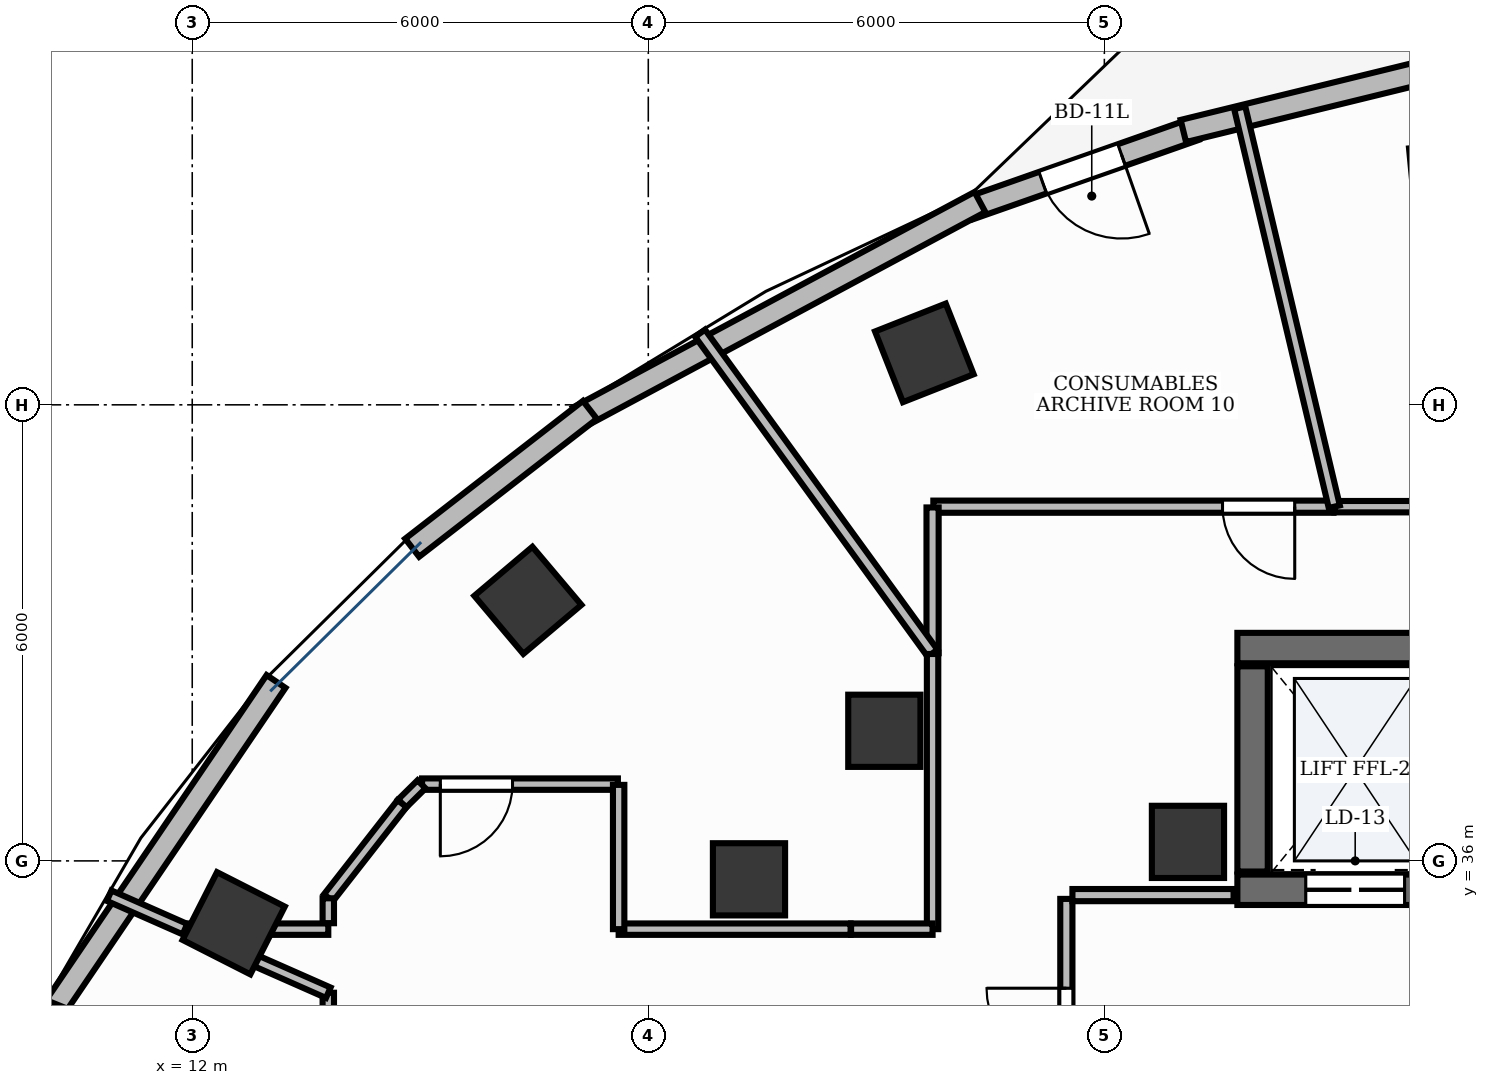
"""IFC4 building model, lengths in metres.
Left out: names, types, materials, properties, quantities, classifications, styles, units other than length and angle.
Written with IfcOpenShell. Run it as: python <this file> out.ifc"""

import sys

from ifc_helpers import new_model, si_unit, direction, frame, frame_2d, origin, origin_2d, place, context, subcontext, project, spatial, rectangle, extrude, element, fill, save


model = new_model("IFC4")
c1 = context("Model", 3, precision=1e-05, world=origin(), true_north=direction((0.0, 1.0)))
c2 = subcontext(c1, "Body", "Model", "MODEL_VIEW")
j1 = project(units=[si_unit("LENGTHUNIT", "METRE"), si_unit("PLANEANGLEUNIT", "RADIAN")], contexts=[c1])
p1 = place(None, origin())
s1 = spatial("IfcSite", under=j1, at=p1, CompositionType="ELEMENT")
p2 = place(p1, origin())
s2 = spatial("IfcBuilding", under=s1, at=p2, CompositionType="ELEMENT")
p3 = place(p2, frame((0.0, 0.0, 204.6)))
s3 = spatial("IfcBuildingStorey", under=s2, at=p3, CompositionType="ELEMENT", Elevation=204.6)
p4 = place(p3, frame((25.75, 38.8, 0.0), z_axis=(0.0, 0.0, 1.0), x_axis=(1.0, 0.0, 0.0)))
e1 = element("IfcWall", 1, at=p4, inside=s3, PredefinedType="SHEAR", context=c2, shape_type="SweptSolid", body=[
    extrude(rectangle(XDim=3.1, YDim=0.4, at=frame_2d((1.55, 0.0))), origin(), (0.0, 0.0, 1.0), 3.9),
])
p5 = place(p3, frame((25.75, 35.62, 0.0), z_axis=(0.0, 0.0, 1.0), x_axis=(1.0, 0.0, 0.0)))
e2 = element("IfcWall", 2, at=p5, inside=s3, PredefinedType="SHEAR", context=c2, shape_type="SweptSolid", body=[
    extrude(rectangle(XDim=3.1, YDim=0.4, at=frame_2d((1.55, 0.0))), origin(), (0.0, 0.0, 1.0), 3.9),
])
p6 = place(p5, frame((0.9, 0.0, 0.0)))
e3 = element("IfcOpeningElement", 3, at=p6, cuts=e2, PredefinedType="OPENING", context=c2, shape_type="SweptSolid", body=[
    extrude(rectangle(XDim=1.3, YDim=2.2, at=frame_2d((0.65, 1.1))), frame((0.0, 0.215, 0.0), z_axis=(0.0, -1.0, 0.0), x_axis=(1.0, 0.0, 0.0)), (0.0, 0.0, 1.0), 0.43),
])
p7 = place(p3, frame((25.95, 35.86, 0.0), z_axis=(0.0, 0.0, 1.0), x_axis=(0.0, 1.0, 0.0)))
e4 = element("IfcWall", 4, at=p7, inside=s3, PredefinedType="SHEAR", context=c2, shape_type="SweptSolid", body=[
    extrude(rectangle(XDim=2.7, YDim=0.4, at=frame_2d((1.35, 0.0))), origin(), (0.0, 0.0, 1.0), 3.9),
])
p8 = place(p3, frame((25.1, 36.25, -0.0), z_axis=(0.0, 0.0, 1.0), x_axis=(1.0, 0.0, 0.0)))
e5 = element("IfcColumn", 5, at=p8, inside=s3, PredefinedType="PILASTER", context=c2, shape_type="SweptSolid", body=[
    extrude(rectangle(XDim=0.95, YDim=0.95, at=origin_2d()), origin(), (0.0, 0.0, 1.0), 3.901),
])
for number, where, z_axis, x_axis in (
    (6, (28.554, 44.924, -0.0), (0.0, 0.0, 1.0), (0.995, 0.095, 0.0)),
    (7, (21.632, 42.684, -0.0), (0.0, 0.0, 1.0), (0.93, 0.367, 0.0)),
    (8, (16.416, 39.427, -0.0), (0.0, 0.0, 1.0), (0.764, 0.645, 0.0)),
):
    element("IfcColumn", number, at=place(p3, frame(where, z_axis=z_axis, x_axis=x_axis)), inside=s3, PredefinedType="COLUMN", context=c2, shape_type="SweptSolid", body=[
        extrude(rectangle(XDim=1.0, YDim=1.0, at=origin_2d()), origin(), (0.0, 0.0, 1.0), 3.901),
    ])
p9 = place(p3, frame((21.105, 37.712, -0.0), z_axis=(0.0, 0.0, 1.0), x_axis=(1.0, 0.0, 0.0)))
e9 = element("IfcColumn", 9, at=p9, inside=s3, PredefinedType="COLUMN", context=c2, shape_type="SweptSolid", body=[
    extrude(rectangle(XDim=0.95, YDim=0.95, at=origin_2d()), origin(), (0.0, 0.0, 1.0), 3.901),
])
p10 = place(p3, frame((12.545, 35.18, -0.0), z_axis=(0.0, 0.0, 1.0), x_axis=(0.453057191132, 0.891481453292, 0.0)))
e10 = element("IfcColumn", 10, at=p10, inside=s3, PredefinedType="COLUMN", context=c2, shape_type="SweptSolid", body=[
    extrude(rectangle(XDim=1.0, YDim=1.0, at=origin_2d()), origin(), (0.0, 0.0, 1.0), 3.901),
])
p11 = place(p3, frame((19.325, 35.758, -0.0), z_axis=(0.0, 0.0, 1.0), x_axis=(1.0, 0.0, 0.0)))
e11 = element("IfcColumn", 11, at=p11, inside=s3, PredefinedType="COLUMN", context=c2, shape_type="SweptSolid", body=[
    extrude(rectangle(XDim=0.95, YDim=0.95, at=origin_2d()), origin(), (0.0, 0.0, 1.0), 3.901),
])
p12 = place(p3, frame((25.193, 45.627, 0.0), z_axis=(0.0, 0.0, 1.0), x_axis=(-0.94341621231, -0.331610992506, 0.0)))
e12 = element("IfcWall", 12, at=p12, inside=s3, PredefinedType="STANDARD", context=c2, shape_type="SweptSolid", body=[
    extrude(rectangle(XDim=3.148, YDim=0.3, at=frame_2d((1.574, 0.0))), origin(), (0.0, 0.0, 1.0), 3.9),
])
p13 = place(p12, frame((1.024, 0.0, 0.0)))
e13 = element("IfcOpeningElement", 13, at=p13, cuts=e12, PredefinedType="OPENING", context=c2, shape_type="SweptSolid", body=[
    extrude(rectangle(XDim=1.1, YDim=2.15, at=frame_2d((0.55, 1.075))), frame((0.0, 0.165, 0.0), z_axis=(0.0, -1.0, 0.0), x_axis=(1.0, 0.0, 0.0)), (0.0, 0.0, 1.0), 0.33),
])
p14 = place(p3, frame((28.187, 46.374, 0.0), z_axis=(0.0, 0.0, 1.0), x_axis=(-0.971279195983, -0.237942689423, 0.0)))
e14 = element("IfcWall", 14, at=p14, inside=s3, PredefinedType="STANDARD", context=c2, shape_type="SweptSolid", body=[
    extrude(rectangle(XDim=3.241, YDim=0.3, at=frame_2d((1.621, 0.0))), origin(), (0.0, 0.0, 1.0), 3.9),
])
p15 = place(p3, frame((22.363, 44.668, 0.0), z_axis=(0.0, 0.0, 1.0), x_axis=(-0.88123472541, -0.472678917164, 0.0)))
e15 = element("IfcWall", 15, at=p15, inside=s3, PredefinedType="STANDARD", context=c2, shape_type="SweptSolid", body=[
    extrude(rectangle(XDim=5.997, YDim=0.3, at=frame_2d((2.998, 0.0))), origin(), (0.0, 0.0, 1.0), 3.47),
])
p16 = place(p3, frame((17.232, 41.933, 0.0), z_axis=(0.0, 0.0, 1.0), x_axis=(-0.790315182738, -0.612700507536, 0.0)))
e16 = element("IfcWall", 16, at=p16, inside=s3, PredefinedType="STANDARD", context=c2, shape_type="SweptSolid", body=[
    extrude(rectangle(XDim=2.959, YDim=0.3, at=frame_2d((1.48, 0.0))), origin(), (0.0, 0.0, 1.0), 3.47),
])
p17 = place(p3, frame((13.103, 38.36, 0.0), z_axis=(0.0, 0.0, 1.0), x_axis=(-0.561387104339, -0.827553333074, 0.0)))
e17 = element("IfcWall", 17, at=p17, inside=s3, PredefinedType="STANDARD", context=c2, shape_type="SweptSolid", body=[
    extrude(rectangle(XDim=5.327, YDim=0.3, at=frame_2d((2.664, 0.0))), origin(), (0.0, 0.0, 1.0), 3.9),
])
p18 = place(p3, frame((10.201, 34.118, 0.0), z_axis=(0.0, 0.0, 1.0), x_axis=(-0.373821251241, -0.927500766642, 0.0)))
e18 = element("IfcWall", 18, at=p18, inside=s3, PredefinedType="STANDARD", context=c2, shape_type="SweptSolid", body=[
    extrude(rectangle(XDim=2.648, YDim=0.3, at=frame_2d((1.324, 0.0))), origin(), (0.0, 0.0, 1.0), 3.9),
])
p19 = place(p3, frame((23.5, 32.1, 0.0), z_axis=(0.0, 0.0, 1.0), x_axis=(0.0, 1.0, 0.0)))
e19 = element("IfcWall", 19, at=p19, inside=s3, PredefinedType="PARTITIONING", context=c2, shape_type="SweptSolid", body=[
    extrude(rectangle(XDim=3.4, YDim=0.16, at=frame_2d((1.7, 0.0))), origin(), (0.0, 0.0, 1.0), 2.91),
])
p20 = place(p19, frame((1.175, 0.0, 0.0)))
e20 = element("IfcOpeningElement", 20, at=p20, cuts=e19, PredefinedType="OPENING", context=c2, shape_type="SweptSolid", body=[
    extrude(rectangle(XDim=1.05, YDim=2.15, at=frame_2d((0.525, 1.075))), frame((0.0, 0.095, 0.0), z_axis=(0.0, -1.0, 0.0), x_axis=(1.0, 0.0, 0.0)), (0.0, 0.0, 1.0), 0.19),
])
p21 = place(p3, frame((23.58, 35.55, 0.0), z_axis=(0.0, 0.0, 1.0), x_axis=(1.0, 0.0, 0.0)))
e21 = element("IfcWall", 21, at=p21, inside=s3, PredefinedType="PARTITIONING", context=c2, shape_type="SweptSolid", body=[
    extrude(rectangle(XDim=2.12, YDim=0.16, at=frame_2d((1.06, 0.0))), origin(), (0.0, 0.0, 1.0), 2.91),
])
p22 = place(p3, frame((34.642, 40.66, 0.0), z_axis=(0.0, 0.0, 1.0), x_axis=(-1.0, 0.0, 0.0)))
e22 = element("IfcWall", 22, at=p22, inside=s3, PredefinedType="PARTITIONING", context=c2, shape_type="SweptSolid", body=[
    extrude(rectangle(XDim=7.617, YDim=0.15, at=frame_2d((3.809, 0.0))), origin(), (0.0, 0.0, 1.0), 2.91),
])
p23 = place(p22, frame((2.872, 0.0, 0.0)))
e23 = element("IfcOpeningElement", 23, at=p23, cuts=e22, PredefinedType="OPENING", context=c2, shape_type="SweptSolid", body=[
    extrude(rectangle(XDim=0.95, YDim=2.15, at=frame_2d((0.475, 1.075))), frame((0.0, 0.09, 0.0), z_axis=(0.0, -1.0, 0.0), x_axis=(1.0, 0.0, 0.0)), (0.0, 0.0, 1.0), 0.18),
])
p24 = place(p3, frame((27.015, 40.66, 0.0), z_axis=(0.0, 0.0, 1.0), x_axis=(-1.0, 0.0, 0.0)))
e24 = element("IfcWall", 24, at=p24, inside=s3, PredefinedType="PARTITIONING", context=c2, shape_type="SweptSolid", body=[
    extrude(rectangle(XDim=5.265, YDim=0.16, at=frame_2d((2.632, 0.0))), origin(), (0.0, 0.0, 1.0), 2.91),
])
p25 = place(p24, frame((0.51, 0.0, 0.0)))
e25 = element("IfcOpeningElement", 25, at=p25, cuts=e24, PredefinedType="OPENING", context=c2, shape_type="SweptSolid", body=[
    extrude(rectangle(XDim=0.95, YDim=2.15, at=frame_2d((0.475, 1.075))), frame((0.0, 0.095, 0.0), z_axis=(0.0, -1.0, 0.0), x_axis=(1.0, 0.0, 0.0)), (0.0, 0.0, 1.0), 0.19),
])
p26 = place(p3, frame((17.6, 37.01, 0.0), z_axis=(0.0, 0.0, 1.0), x_axis=(-1.0, 0.0, 0.0)))
e26 = element("IfcWall", 26, at=p26, inside=s3, PredefinedType="PARTITIONING", context=c2, shape_type="SweptSolid", body=[
    extrude(rectangle(XDim=2.576, YDim=0.15, at=frame_2d((1.288, 0.0))), origin(), (0.0, 0.0, 1.0), 2.91),
])
p27 = place(p26, frame((1.386, 0.0, 0.0)))
e27 = element("IfcOpeningElement", 27, at=p27, cuts=e26, PredefinedType="OPENING", context=c2, shape_type="SweptSolid", body=[
    extrude(rectangle(XDim=0.95, YDim=2.15, at=frame_2d((0.475, 1.075))), frame((0.0, 0.09, 0.0), z_axis=(0.0, -1.0, 0.0), x_axis=(1.0, 0.0, 0.0)), (0.0, 0.0, 1.0), 0.18),
])
p28 = place(p3, frame((13.79, 34.266, 0.0), z_axis=(0.0, 0.0, 1.0), x_axis=(0.0, -1.0, 0.0)))
e28 = element("IfcWall", 28, at=p28, inside=s3, PredefinedType="PARTITIONING", context=c2, shape_type="SweptSolid", body=[
    extrude(rectangle(XDim=2.056, YDim=0.15, at=frame_2d((1.028, 0.0))), origin(), (0.0, 0.0, 1.0), 2.91),
])
p29 = place(p28, frame((0.865, 0.0, 0.0)))
e29 = element("IfcOpeningElement", 29, at=p29, cuts=e28, PredefinedType="OPENING", context=c2, shape_type="SweptSolid", body=[
    extrude(rectangle(XDim=0.95, YDim=2.15, at=frame_2d((0.475, 1.075))), frame((0.0, 0.09, 0.0), z_axis=(0.0, -1.0, 0.0), x_axis=(1.0, 0.0, 0.0)), (0.0, 0.0, 1.0), 0.18),
])
p30 = place(p3, frame((27.025, 40.66, 0.0), z_axis=(0.0, 0.0, 1.0), x_axis=(-0.230673918081, 0.973031111279, 0.0)))
e30 = element("IfcWall", 30, at=p30, inside=s3, PredefinedType="PARTITIONING", context=c2, shape_type="SweptSolid", body=[
    extrude(rectangle(XDim=5.394, YDim=0.15, at=frame_2d((2.697, 0.0))), origin(), (0.0, 0.0, 1.0), 2.91),
])
p31 = place(p3, frame((21.74, 40.65, 0.0), z_axis=(0.0, 0.0, 1.0), x_axis=(0.0, -1.0, 0.0)))
e31 = element("IfcWall", 31, at=p31, inside=s3, PredefinedType="PARTITIONING", context=c2, shape_type="SweptSolid", body=[
    extrude(rectangle(XDim=1.918, YDim=0.16, at=frame_2d((0.959, 0.0))), origin(), (0.0, 0.0, 1.0), 2.91),
])
p32 = place(p3, frame((21.74, 38.732, 0.0), z_axis=(0.0, 0.0, 1.0), x_axis=(-0.587778316098, 0.80902203377, 0.0)))
e32 = element("IfcWall", 32, at=p32, inside=s3, PredefinedType="PARTITIONING", context=c2, shape_type="SweptSolid", body=[
    extrude(rectangle(XDim=5.204, YDim=0.16, at=frame_2d((2.602, 0.0))), origin(), (0.0, 0.0, 1.0), 2.91),
])
p33 = place(p3, frame((21.74, 38.722, 0.0), z_axis=(0.0, 0.0, 1.0), x_axis=(0.0, -1.0, 0.0)))
e33 = element("IfcWall", 33, at=p33, inside=s3, PredefinedType="PARTITIONING", context=c2, shape_type="SweptSolid", body=[
    extrude(rectangle(XDim=3.62, YDim=0.15, at=frame_2d((1.81, 0.0))), origin(), (0.0, 0.0, 1.0), 2.91),
])
p34 = place(p3, frame((21.74, 35.102, 0.0), z_axis=(0.0, 0.0, 1.0), x_axis=(-1.0, 0.0, 0.0)))
e34 = element("IfcWall", 34, at=p34, inside=s3, PredefinedType="PARTITIONING", context=c2, shape_type="SweptSolid", body=[
    extrude(rectangle(XDim=1.072, YDim=0.15, at=frame_2d((0.536, 0.0))), origin(), (0.0, 0.0, 1.0), 2.91),
])
p35 = place(p3, frame((20.661, 35.102, 0.0), z_axis=(0.0, 0.0, 1.0), x_axis=(-1.0, 0.0, 0.0)))
e35 = element("IfcWall", 35, at=p35, inside=s3, PredefinedType="PARTITIONING", context=c2, shape_type="SweptSolid", body=[
    extrude(rectangle(XDim=3.051, YDim=0.15, at=frame_2d((1.526, 0.0))), origin(), (0.0, 0.0, 1.0), 2.91),
])
p36 = place(p3, frame((17.61, 35.102, 0.0), z_axis=(0.0, 0.0, 1.0), x_axis=(0.0, 1.0, 0.0)))
e36 = element("IfcWall", 36, at=p36, inside=s3, PredefinedType="PARTITIONING", context=c2, shape_type="SweptSolid", body=[
    extrude(rectangle(XDim=1.898, YDim=0.15, at=frame_2d((0.949, 0.0))), origin(), (0.0, 0.0, 1.0), 2.91),
])
p37 = place(p3, frame((15.017, 37.007, 0.0), z_axis=(0.0, 0.0, 1.0), x_axis=(-0.711174408111, -0.70301561949, 0.0)))
e37 = element("IfcWall", 37, at=p37, inside=s3, PredefinedType="PARTITIONING", context=c2, shape_type="SweptSolid", body=[
    extrude(rectangle(XDim=0.359, YDim=0.15, at=frame_2d((0.18, 0.0))), origin(), (0.0, 0.0, 1.0), 2.91),
])
p38 = place(p3, frame((14.76, 36.754, 0.0), z_axis=(0.0, 0.0, 1.0), x_axis=(-0.615625972761, -0.788038489962, 0.0)))
e38 = element("IfcWall", 38, at=p38, inside=s3, PredefinedType="PARTITIONING", context=c2, shape_type="SweptSolid", body=[
    extrude(rectangle(XDim=1.573, YDim=0.15, at=frame_2d((0.787, 0.0))), origin(), (0.0, 0.0, 1.0), 2.91),
])
p39 = place(p3, frame((13.79, 35.508, 0.0), z_axis=(0.0, 0.0, 1.0), x_axis=(0.0, -1.0, 0.0)))
e39 = element("IfcWall", 39, at=p39, inside=s3, PredefinedType="PARTITIONING", context=c2, shape_type="SweptSolid", body=[
    extrude(rectangle(XDim=0.328, YDim=0.15, at=frame_2d((0.164, 0.0))), origin(), (0.0, 0.0, 1.0), 2.91),
])
p40 = place(p3, frame((13.79, 35.102, 0.0), z_axis=(0.0, 0.0, 1.0), x_axis=(-1.0, 0.0, 0.0)))
e40 = element("IfcWall", 40, at=p40, inside=s3, PredefinedType="PARTITIONING", context=c2, shape_type="SweptSolid", body=[
    extrude(rectangle(XDim=1.885, YDim=0.15, at=frame_2d((0.943, 0.0))), origin(), (0.0, 0.0, 1.0), 2.91),
])
p41 = place(p3, frame((11.904, 35.102, 0.0), z_axis=(0.0, 0.0, 1.0), x_axis=(-0.914934829938, 0.403601606744, 0.0)))
e41 = element("IfcWall", 41, at=p41, inside=s3, PredefinedType="PARTITIONING", context=c2, shape_type="SweptSolid", body=[
    extrude(rectangle(XDim=1.09, YDim=0.15, at=frame_2d((0.545, 0.0))), origin(), (0.0, 0.0, 1.0), 2.91),
])
p42 = place(p3, frame((12.438, 34.862, 0.0), z_axis=(0.0, 0.0, 1.0), x_axis=(0.91487830716, -0.403729715389, 0.0)))
e42 = element("IfcWall", 42, at=p42, inside=s3, PredefinedType="PARTITIONING", context=c2, shape_type="SweptSolid", body=[
    extrude(rectangle(XDim=1.477, YDim=0.15, at=frame_2d((0.739, 0.0))), origin(), (0.0, 0.0, 1.0), 2.91),
])
p43 = place(p13, origin())
e43 = element("IfcDoor", 43, at=p43, inside=s3, OperationType="SINGLE_SWING_LEFT", PredefinedType="DOOR", context=c2, shape_type="SweptSolid", body=[
    extrude(rectangle(XDim=1.1, YDim=2.15, at=frame_2d((0.55, 1.075))), frame((0.0, 0.025, 0.0), z_axis=(0.0, -1.0, 0.0), x_axis=(1.0, 0.0, 0.0)), (0.0, 0.0, 1.0), 0.05),
])
fill(e13, e43)
p44 = place(p6, origin())
e44 = element("IfcDoor", 44, at=p44, inside=s3, OperationType="DOUBLE_DOOR_SLIDING", PredefinedType="DOOR", context=c2, shape_type="SweptSolid", body=[
    extrude(rectangle(XDim=1.3, YDim=2.2, at=frame_2d((0.65, 1.1))), frame((0.0, 0.025, 0.0), z_axis=(0.0, -1.0, 0.0), x_axis=(1.0, 0.0, 0.0)), (0.0, 0.0, 1.0), 0.05),
])
fill(e3, e44)
p45 = place(p20, origin())
e45 = element("IfcDoor", 45, at=p45, inside=s3, OperationType="SINGLE_SWING_RIGHT", PredefinedType="DOOR", context=c2, shape_type="SweptSolid", body=[
    extrude(rectangle(XDim=1.05, YDim=2.15, at=frame_2d((0.525, 1.075))), frame((0.0, 0.025, 0.0), z_axis=(0.0, -1.0, 0.0), x_axis=(1.0, 0.0, 0.0)), (0.0, 0.0, 1.0), 0.05),
])
fill(e20, e45)
p46 = place(p25, origin())
e46 = element("IfcDoor", 46, at=p46, inside=s3, OperationType="SINGLE_SWING_LEFT", PredefinedType="DOOR", context=c2, shape_type="SweptSolid", body=[
    extrude(rectangle(XDim=0.95, YDim=2.15, at=frame_2d((0.475, 1.075))), frame((0.0, 0.025, 0.0), z_axis=(0.0, -1.0, 0.0), x_axis=(1.0, 0.0, 0.0)), (0.0, 0.0, 1.0), 0.05),
])
fill(e25, e46)
p47 = place(p27, origin())
e47 = element("IfcDoor", 47, at=p47, inside=s3, OperationType="SINGLE_SWING_RIGHT", PredefinedType="DOOR", context=c2, shape_type="SweptSolid", body=[
    extrude(rectangle(XDim=0.95, YDim=2.15, at=frame_2d((0.475, 1.075))), frame((0.0, 0.025, 0.0), z_axis=(0.0, -1.0, 0.0), x_axis=(1.0, 0.0, 0.0)), (0.0, 0.0, 1.0), 0.05),
])
fill(e27, e47)
save(model, sys.argv[1])
